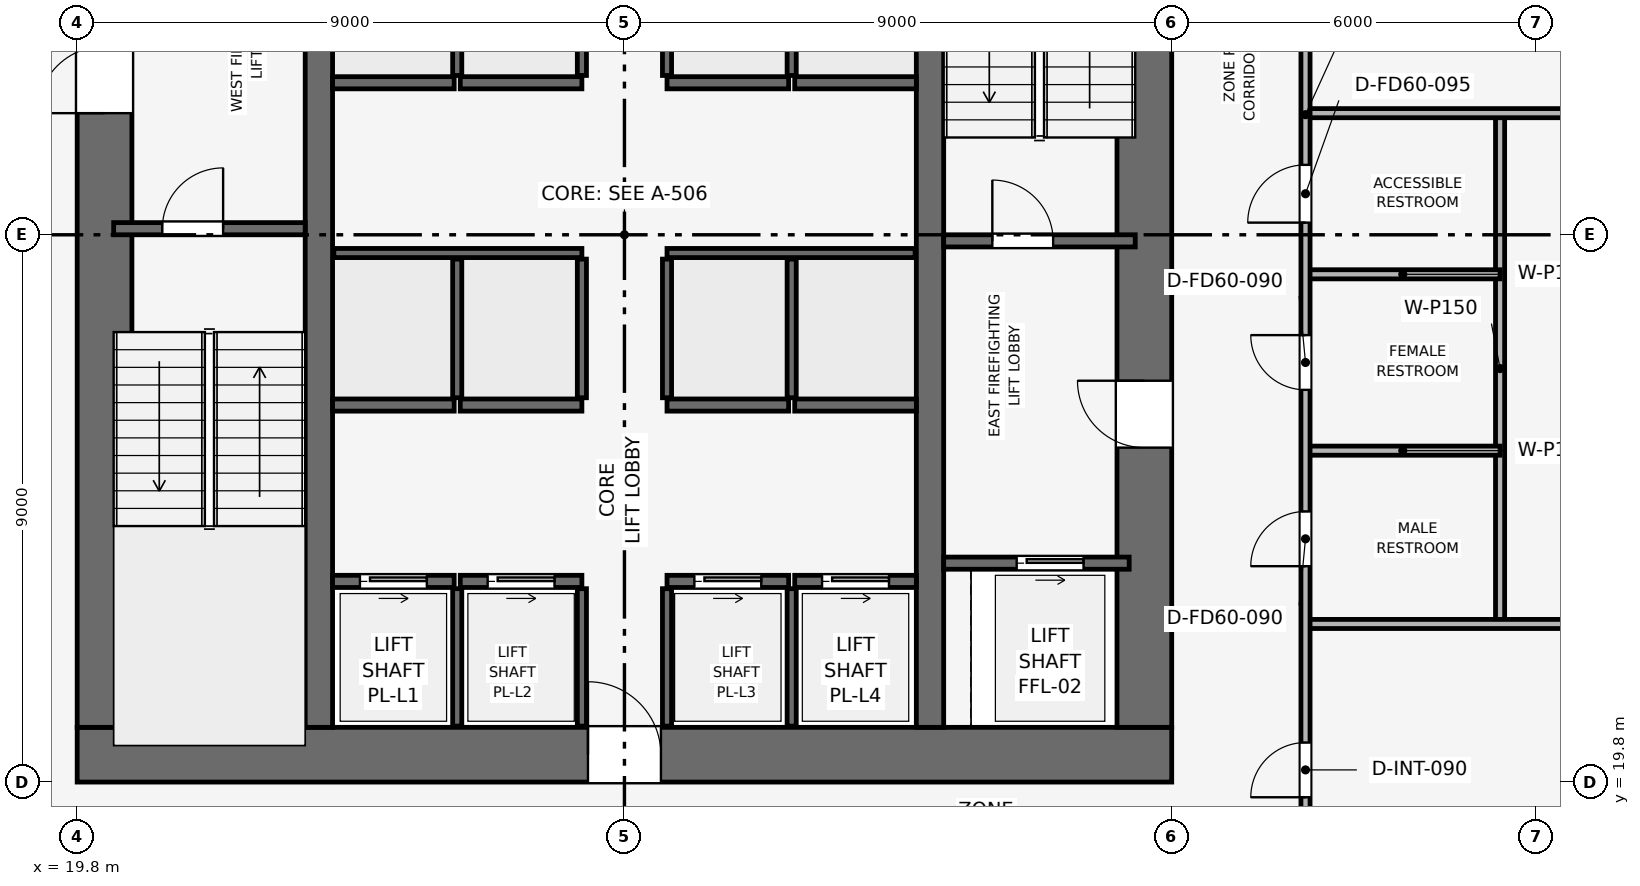
"""IFC4 building model, lengths in metres.
Left out: names, types, materials, properties, quantities, classifications, styles, units other than length and angle.
Written with IfcOpenShell. Run it as: python <this file> out.ifc"""

import sys

from ifc_helpers import new_model, si_unit, direction, frame, frame_2d, origin, place, context, subcontext, project, spatial, rectangle, extrude, element, fill, save


model = new_model("IFC4")
c1 = context("Model", 3, precision=1e-05, world=origin(), true_north=direction((0.0, 1.0)))
c2 = subcontext(c1, "Body", "Model", "MODEL_VIEW")
j1 = project(units=[si_unit("LENGTHUNIT", "METRE"), si_unit("PLANEANGLEUNIT", "RADIAN")], contexts=[c1])
p1 = place(None, origin())
s1 = spatial("IfcSite", under=j1, at=p1, CompositionType="ELEMENT")
p2 = place(p1, origin())
s2 = spatial("IfcBuilding", under=s1, at=p2, CompositionType="ELEMENT")
p3 = place(p2, frame((0.0, 0.0, 117.3)))
s3 = spatial("IfcBuildingStorey", under=s2, at=p3, CompositionType="ELEMENT", Elevation=117.3)
p4 = place(p3, frame((19.8, 20.25, 0.0), z_axis=(0.0, 0.0, 1.0), x_axis=(1.0, 0.0, 0.0)))
e1 = element("IfcWall", 1, at=p4, inside=s3, PredefinedType="SHEAR", context=c2, shape_type="SweptSolid", body=[
    extrude(rectangle(XDim=18.0, YDim=0.9, at=frame_2d((9.0, 0.0))), origin(), (0.0, 0.0, 1.0), 3.9),
])
p5 = place(p4, frame((8.4, 0.0, 0.0)))
e2 = element("IfcOpeningElement", 2, at=p5, cuts=e1, PredefinedType="OPENING", context=c2, shape_type="SweptSolid", body=[
    extrude(rectangle(XDim=1.2, YDim=2.2, at=frame_2d((0.6, 1.1))), frame((0.0, 0.46, 0.0), z_axis=(0.0, -1.0, 0.0), x_axis=(1.0, 0.0, 0.0)), (0.0, 0.0, 1.0), 0.92),
])
p6 = place(p3, frame((20.25, 20.7, 0.0), z_axis=(0.0, 0.0, 1.0), x_axis=(0.0, 1.0, 0.0)))
e3 = element("IfcWall", 3, at=p6, inside=s3, PredefinedType="SHEAR", context=c2, shape_type="SweptSolid", body=[
    extrude(rectangle(XDim=16.2, YDim=0.9, at=frame_2d((8.1, 0.0))), origin(), (0.0, 0.0, 1.0), 3.9),
])
p7 = place(p6, frame((10.1, 0.0, 0.0)))
e4 = element("IfcOpeningElement", 4, at=p7, cuts=e3, PredefinedType="OPENING", context=c2, shape_type="SweptSolid", body=[
    extrude(rectangle(XDim=1.1, YDim=2.15, at=frame_2d((0.55, 1.075))), frame((0.0, 0.46, 0.0), z_axis=(0.0, -1.0, 0.0), x_axis=(1.0, 0.0, 0.0)), (0.0, 0.0, 1.0), 0.92),
])
p8 = place(p3, frame((37.35, 20.7, 0.0), z_axis=(0.0, 0.0, 1.0), x_axis=(0.0, 1.0, 0.0)))
e5 = element("IfcWall", 5, at=p8, inside=s3, PredefinedType="SHEAR", context=c2, shape_type="SweptSolid", body=[
    extrude(rectangle(XDim=16.2, YDim=0.9, at=frame_2d((8.1, 0.0))), origin(), (0.0, 0.0, 1.0), 3.9),
])
p9 = place(p8, frame((4.6, 0.0, 0.0)))
e6 = element("IfcOpeningElement", 6, at=p9, cuts=e5, PredefinedType="OPENING", context=c2, shape_type="SweptSolid", body=[
    extrude(rectangle(XDim=1.1, YDim=2.15, at=frame_2d((0.55, 1.075))), frame((0.0, 0.46, 0.0), z_axis=(0.0, -1.0, 0.0), x_axis=(1.0, 0.0, 0.0)), (0.0, 0.0, 1.0), 0.92),
])
for number, where, z_axis, x_axis in (
    (7, (23.775, 20.7, 0.0), (0.0, 0.0, 1.0), (0.0, 1.0, 0.0)),
    (8, (33.825, 20.7, 0.0), (0.0, 0.0, 1.0), (0.0, 1.0, 0.0)),
):
    element("IfcWall", number, at=place(p3, frame(where, z_axis=z_axis, x_axis=x_axis)), inside=s3, PredefinedType="SHEAR", context=c2, shape_type="SweptSolid", body=[
        extrude(rectangle(XDim=16.2, YDim=0.45, at=frame_2d((8.1, 0.0))), origin(), (0.0, 0.0, 1.0), 3.9),
    ])
p10 = place(p3, frame((20.4, 28.9, 0.0), z_axis=(0.0, 0.0, 1.0), x_axis=(1.0, 0.0, 0.0)))
e9 = element("IfcWall", 9, at=p10, inside=s3, PredefinedType="SHEAR", context=c2, shape_type="SweptSolid", body=[
    extrude(rectangle(XDim=3.15, YDim=0.2, at=frame_2d((1.575, 0.0))), origin(), (0.0, 0.0, 1.0), 3.65),
])
p11 = place(p10, frame((0.8, 0.0, 0.0)))
e10 = element("IfcOpeningElement", 10, at=p11, cuts=e9, PredefinedType="OPENING", context=c2, shape_type="SweptSolid", body=[
    extrude(rectangle(XDim=1.0, YDim=2.1, at=frame_2d((0.5, 1.05))), frame((0.0, 0.11, 0.0), z_axis=(0.0, -1.0, 0.0), x_axis=(1.0, 0.0, 0.0)), (0.0, 0.0, 1.0), 0.22),
])
p12 = place(p3, frame((34.05, 28.7, 0.0), z_axis=(0.0, 0.0, 1.0), x_axis=(1.0, 0.0, 0.0)))
e11 = element("IfcWall", 11, at=p12, inside=s3, PredefinedType="SHEAR", context=c2, shape_type="SweptSolid", body=[
    extrude(rectangle(XDim=3.15, YDim=0.2, at=frame_2d((1.575, 0.0))), origin(), (0.0, 0.0, 1.0), 3.65),
])
p13 = place(p12, frame((0.8, 0.0, 0.0)))
e12 = element("IfcOpeningElement", 12, at=p13, cuts=e11, PredefinedType="OPENING", context=c2, shape_type="SweptSolid", body=[
    extrude(rectangle(XDim=1.0, YDim=2.1, at=frame_2d((0.5, 1.05))), frame((0.0, 0.11, 0.0), z_axis=(0.0, -1.0, 0.0), x_axis=(1.0, 0.0, 0.0)), (0.0, 0.0, 1.0), 0.22),
])
p14 = place(p3, frame((34.05, 23.4, 0.0), z_axis=(0.0, 0.0, 1.0), x_axis=(1.0, 0.0, 0.0)))
e13 = element("IfcWall", 13, at=p14, inside=s3, PredefinedType="SHEAR", context=c2, shape_type="SweptSolid", body=[
    extrude(rectangle(XDim=3.05, YDim=0.2, at=frame_2d((1.525, 0.0))), origin(), (0.0, 0.0, 1.0), 3.65),
])
p15 = place(p14, frame((1.2, 0.0, 0.0)))
e14 = element("IfcOpeningElement", 14, at=p15, cuts=e13, PredefinedType="OPENING", context=c2, shape_type="SweptSolid", body=[
    extrude(rectangle(XDim=1.1, YDim=2.15, at=frame_2d((0.55, 1.075))), frame((0.0, 0.11, 0.0), z_axis=(0.0, -1.0, 0.0), x_axis=(1.0, 0.0, 0.0)), (0.0, 0.0, 1.0), 0.22),
])
p16 = place(p3, frame((24.0, 23.1, 0.0), z_axis=(0.0, 0.0, 1.0), x_axis=(1.0, 0.0, 0.0)))
e15 = element("IfcWall", 15, at=p16, inside=s3, PredefinedType="SHEAR", context=c2, shape_type="SweptSolid", body=[
    extrude(rectangle(XDim=2.0, YDim=0.2, at=frame_2d((1.0, 0.0))), origin(), (0.0, 0.0, 1.0), 3.65),
])
p17 = place(p16, frame((0.45, 0.0, 0.0)))
e16 = element("IfcOpeningElement", 16, at=p17, cuts=e15, PredefinedType="OPENING", context=c2, shape_type="SweptSolid", body=[
    extrude(rectangle(XDim=1.1, YDim=2.15, at=frame_2d((0.55, 1.075))), frame((0.0, 0.11, 0.0), z_axis=(0.0, -1.0, 0.0), x_axis=(1.0, 0.0, 0.0)), (0.0, 0.0, 1.0), 0.22),
])
p18 = place(p3, frame((26.1, 23.1, 0.0), z_axis=(0.0, 0.0, 1.0), x_axis=(1.0, 0.0, 0.0)))
e17 = element("IfcWall", 17, at=p18, inside=s3, PredefinedType="SHEAR", context=c2, shape_type="SweptSolid", body=[
    extrude(rectangle(XDim=2.0, YDim=0.2, at=frame_2d((1.0, 0.0))), origin(), (0.0, 0.0, 1.0), 3.65),
])
p19 = place(p18, frame((0.45, 0.0, 0.0)))
e18 = element("IfcOpeningElement", 18, at=p19, cuts=e17, PredefinedType="OPENING", context=c2, shape_type="SweptSolid", body=[
    extrude(rectangle(XDim=1.1, YDim=2.15, at=frame_2d((0.55, 1.075))), frame((0.0, 0.11, 0.0), z_axis=(0.0, -1.0, 0.0), x_axis=(1.0, 0.0, 0.0)), (0.0, 0.0, 1.0), 0.22),
])
p20 = place(p3, frame((29.5, 23.1, 0.0), z_axis=(0.0, 0.0, 1.0), x_axis=(1.0, 0.0, 0.0)))
e19 = element("IfcWall", 19, at=p20, inside=s3, PredefinedType="SHEAR", context=c2, shape_type="SweptSolid", body=[
    extrude(rectangle(XDim=2.0, YDim=0.2, at=frame_2d((1.0, 0.0))), origin(), (0.0, 0.0, 1.0), 3.65),
])
p21 = place(p20, frame((0.45, 0.0, 0.0)))
e20 = element("IfcOpeningElement", 20, at=p21, cuts=e19, PredefinedType="OPENING", context=c2, shape_type="SweptSolid", body=[
    extrude(rectangle(XDim=1.1, YDim=2.15, at=frame_2d((0.55, 1.075))), frame((0.0, 0.11, 0.0), z_axis=(0.0, -1.0, 0.0), x_axis=(1.0, 0.0, 0.0)), (0.0, 0.0, 1.0), 0.22),
])
p22 = place(p3, frame((31.6, 23.1, 0.0), z_axis=(0.0, 0.0, 1.0), x_axis=(1.0, 0.0, 0.0)))
e21 = element("IfcWall", 21, at=p22, inside=s3, PredefinedType="SHEAR", context=c2, shape_type="SweptSolid", body=[
    extrude(rectangle(XDim=2.0, YDim=0.2, at=frame_2d((1.0, 0.0))), origin(), (0.0, 0.0, 1.0), 3.65),
])
p23 = place(p22, frame((0.45, 0.0, 0.0)))
e22 = element("IfcOpeningElement", 22, at=p23, cuts=e21, PredefinedType="OPENING", context=c2, shape_type="SweptSolid", body=[
    extrude(rectangle(XDim=1.1, YDim=2.15, at=frame_2d((0.55, 1.075))), frame((0.0, 0.11, 0.0), z_axis=(0.0, -1.0, 0.0), x_axis=(1.0, 0.0, 0.0)), (0.0, 0.0, 1.0), 0.22),
])
for number, where, z_axis, x_axis in (
    (23, (24.0, 26.0, 0.0), (0.0, 0.0, 1.0), (1.0, 0.0, 0.0)),
    (24, (26.1, 26.0, 0.0), (0.0, 0.0, 1.0), (1.0, 0.0, 0.0)),
    (25, (29.5, 26.0, 0.0), (0.0, 0.0, 1.0), (1.0, 0.0, 0.0)),
    (26, (31.6, 26.0, 0.0), (0.0, 0.0, 1.0), (1.0, 0.0, 0.0)),
    (27, (24.0, 31.3, 0.0), (0.0, 0.0, 1.0), (1.0, 0.0, 0.0)),
    (28, (26.1, 31.3, 0.0), (0.0, 0.0, 1.0), (1.0, 0.0, 0.0)),
    (29, (29.5, 31.3, 0.0), (0.0, 0.0, 1.0), (1.0, 0.0, 0.0)),
    (30, (31.6, 31.3, 0.0), (0.0, 0.0, 1.0), (1.0, 0.0, 0.0)),
):
    element("IfcWall", number, at=place(p3, frame(where, z_axis=z_axis, x_axis=x_axis)), inside=s3, PredefinedType="SHEAR", context=c2, shape_type="SweptSolid", body=[
        extrude(rectangle(XDim=2.0, YDim=0.2, at=frame_2d((1.0, 0.0))), origin(), (0.0, 0.0, 1.0), 3.65),
    ])
for number, where, z_axis, x_axis in (
    (31, (26.05, 20.72, 0.0), (0.0, 0.0, 1.0), (0.0, 1.0, 0.0)),
    (32, (28.1, 20.72, 0.0), (0.0, 0.0, 1.0), (0.0, 1.0, 0.0)),
    (33, (29.5, 20.72, 0.0), (0.0, 0.0, 1.0), (0.0, 1.0, 0.0)),
    (34, (31.55, 20.72, 0.0), (0.0, 0.0, 1.0), (0.0, 1.0, 0.0)),
):
    element("IfcWall", number, at=place(p3, frame(where, z_axis=z_axis, x_axis=x_axis)), inside=s3, PredefinedType="SHEAR", context=c2, shape_type="SweptSolid", body=[
        extrude(rectangle(XDim=2.26, YDim=0.15, at=frame_2d((1.13, 0.0))), origin(), (0.0, 0.0, 1.0), 3.65),
    ])
for number, where, z_axis, x_axis in (
    (35, (24.02, 28.5, 0.0), (0.0, 0.0, 1.0), (1.0, 0.0, 0.0)),
    (36, (29.5, 28.5, 0.0), (0.0, 0.0, 1.0), (1.0, 0.0, 0.0)),
):
    element("IfcWall", number, at=place(p3, frame(where, z_axis=z_axis, x_axis=x_axis)), inside=s3, PredefinedType="SHEAR", context=c2, shape_type="SweptSolid", body=[
        extrude(rectangle(XDim=4.08, YDim=0.15, at=frame_2d((2.04, 0.0))), origin(), (0.0, 0.0, 1.0), 3.65),
    ])
for number, where, z_axis, x_axis in (
    (37, (26.05, 26.12, 0.0), (0.0, 0.0, 1.0), (0.0, 1.0, 0.0)),
    (38, (28.1, 26.12, 0.0), (0.0, 0.0, 1.0), (0.0, 1.0, 0.0)),
    (39, (29.5, 26.12, 0.0), (0.0, 0.0, 1.0), (0.0, 1.0, 0.0)),
    (40, (31.55, 26.12, 0.0), (0.0, 0.0, 1.0), (0.0, 1.0, 0.0)),
):
    element("IfcWall", number, at=place(p3, frame(where, z_axis=z_axis, x_axis=x_axis)), inside=s3, PredefinedType="SHEAR", context=c2, shape_type="SweptSolid", body=[
        extrude(rectangle(XDim=2.28, YDim=0.15, at=frame_2d((1.14, 0.0))), origin(), (0.0, 0.0, 1.0), 3.65),
    ])
for number, where, z_axis, x_axis in (
    (41, (26.05, 31.42, 0.0), (0.0, 0.0, 1.0), (0.0, 1.0, 0.0)),
    (42, (28.1, 31.42, 0.0), (0.0, 0.0, 1.0), (0.0, 1.0, 0.0)),
    (43, (29.5, 31.42, 0.0), (0.0, 0.0, 1.0), (0.0, 1.0, 0.0)),
    (44, (31.55, 31.42, 0.0), (0.0, 0.0, 1.0), (0.0, 1.0, 0.0)),
):
    element("IfcWall", number, at=place(p3, frame(where, z_axis=z_axis, x_axis=x_axis)), inside=s3, PredefinedType="SHEAR", context=c2, shape_type="SweptSolid", body=[
        extrude(rectangle(XDim=2.24, YDim=0.15, at=frame_2d((1.12, 0.0))), origin(), (0.0, 0.0, 1.0), 3.65),
    ])
p24 = place(p3, frame((43.2, 22.4, 0.0), z_axis=(0.0, 0.0, 1.0), x_axis=(0.0, 1.0, 0.0)))
e45 = element("IfcWall", 45, at=p24, inside=s3, PredefinedType="PARTITIONING", context=c2, shape_type="SweptSolid", body=[
    extrude(rectangle(XDim=8.4, YDim=0.15, at=frame_2d((4.2, 0.0))), origin(), (0.0, 0.0, 1.0), 3.185),
])
p25 = place(p3, frame((40.0, 22.4, 0.0), z_axis=(0.0, 0.0, 1.0), x_axis=(1.0, 0.0, 0.0)))
e46 = element("IfcWall", 46, at=p25, inside=s3, PredefinedType="PARTITIONING", context=c2, shape_type="SweptSolid", body=[
    extrude(rectangle(XDim=14.77, YDim=0.15, at=frame_2d((7.385, 0.0))), origin(), (0.0, 0.0, 1.0), 3.035),
])
p26 = place(p25, frame((8.535, 0.0, 0.0)))
e47 = element("IfcOpeningElement", 47, at=p26, cuts=e46, PredefinedType="OPENING", context=c2, shape_type="SweptSolid", body=[
    extrude(rectangle(XDim=0.9, YDim=2.1, at=frame_2d((0.45, 1.05))), frame((0.0, 0.085, 0.0), z_axis=(0.0, -1.0, 0.0), x_axis=(1.0, 0.0, 0.0)), (0.0, 0.0, 1.0), 0.17),
])
p27 = place(p3, frame((40.0, 30.8, 0.0), z_axis=(0.0, 0.0, 1.0), x_axis=(1.0, 0.0, 0.0)))
e48 = element("IfcWall", 48, at=p27, inside=s3, PredefinedType="PARTITIONING", context=c2, shape_type="SweptSolid", body=[
    extrude(rectangle(XDim=14.77, YDim=0.15, at=frame_2d((7.385, 0.0))), origin(), (0.0, 0.0, 1.0), 3.035),
])
for number, where, z_axis, x_axis in (
    (49, (40.0, 25.25, 0.0), (0.0, 0.0, 1.0), (1.0, 0.0, 0.0)),
    (50, (40.0, 28.15, 0.0), (0.0, 0.0, 1.0), (1.0, 0.0, 0.0)),
):
    element("IfcWall", number, at=place(p3, frame(where, z_axis=z_axis, x_axis=x_axis)), inside=s3, PredefinedType="PARTITIONING", context=c2, shape_type="SweptSolid", body=[
        extrude(rectangle(XDim=3.2, YDim=0.15, at=frame_2d((1.6, 0.0))), origin(), (0.0, 0.0, 1.0), 3.65),
    ])
p28 = place(p3, frame((40.0, 17.6, 0.0), z_axis=(0.0, 0.0, 1.0), x_axis=(0.0, 1.0, 0.0)))
e51 = element("IfcWall", 51, at=p28, inside=s3, PredefinedType="PARTITIONING", context=c2, shape_type="SweptSolid", body=[
    extrude(rectangle(XDim=22.4, YDim=0.15, at=frame_2d((11.2, 0.0))), origin(), (0.0, 0.0, 1.0), 3.185),
])
p29 = place(p28, frame((1.95, 0.0, 0.0)))
e52 = element("IfcOpeningElement", 52, at=p29, cuts=e51, PredefinedType="OPENING", context=c2, shape_type="SweptSolid", body=[
    extrude(rectangle(XDim=0.9, YDim=2.1, at=frame_2d((0.45, 1.05))), frame((0.0, 0.085, 0.0), z_axis=(0.0, -1.0, 0.0), x_axis=(1.0, 0.0, 0.0)), (0.0, 0.0, 1.0), 0.17),
])
p30 = place(p28, frame((5.75, 0.0, 0.0)))
e53 = element("IfcOpeningElement", 53, at=p30, cuts=e51, PredefinedType="OPENING", context=c2, shape_type="SweptSolid", body=[
    extrude(rectangle(XDim=0.9, YDim=2.1, at=frame_2d((0.45, 1.05))), frame((0.0, 0.085, 0.0), z_axis=(0.0, -1.0, 0.0), x_axis=(1.0, 0.0, 0.0)), (0.0, 0.0, 1.0), 0.17),
])
p31 = place(p28, frame((8.65, 0.0, 0.0)))
e54 = element("IfcOpeningElement", 54, at=p31, cuts=e51, PredefinedType="OPENING", context=c2, shape_type="SweptSolid", body=[
    extrude(rectangle(XDim=0.9, YDim=2.1, at=frame_2d((0.45, 1.05))), frame((0.0, 0.085, 0.0), z_axis=(0.0, -1.0, 0.0), x_axis=(1.0, 0.0, 0.0)), (0.0, 0.0, 1.0), 0.17),
])
p32 = place(p28, frame((11.4, 0.0, 0.0)))
e55 = element("IfcOpeningElement", 55, at=p32, cuts=e51, PredefinedType="OPENING", context=c2, shape_type="SweptSolid", body=[
    extrude(rectangle(XDim=0.95, YDim=2.1, at=frame_2d((0.475, 1.05))), frame((0.0, 0.085, 0.0), z_axis=(0.0, -1.0, 0.0), x_axis=(1.0, 0.0, 0.0)), (0.0, 0.0, 1.0), 0.17),
])
p33 = place(p28, frame((17.35, 0.0, 0.0)))
e56 = element("IfcOpeningElement", 56, at=p33, cuts=e51, PredefinedType="OPENING", context=c2, shape_type="SweptSolid", body=[
    extrude(rectangle(XDim=0.9, YDim=2.1, at=frame_2d((0.45, 1.05))), frame((0.0, 0.085, 0.0), z_axis=(0.0, -1.0, 0.0), x_axis=(1.0, 0.0, 0.0)), (0.0, 0.0, 1.0), 0.17),
])
p34 = place(p11, origin())
e57 = element("IfcDoor", 57, at=p34, inside=s3, OperationType="SINGLE_SWING_RIGHT", PredefinedType="DOOR", context=c2, shape_type="SweptSolid", body=[
    extrude(rectangle(XDim=1.0, YDim=2.1, at=frame_2d((0.5, 1.05))), frame((0.0, 0.025, 0.0), z_axis=(0.0, -1.0, 0.0), x_axis=(1.0, 0.0, 0.0)), (0.0, 0.0, 1.0), 0.05),
])
fill(e10, e57)
p35 = place(p13, origin())
e58 = element("IfcDoor", 58, at=p35, inside=s3, OperationType="SINGLE_SWING_LEFT", PredefinedType="DOOR", context=c2, shape_type="SweptSolid", body=[
    extrude(rectangle(XDim=1.0, YDim=2.1, at=frame_2d((0.5, 1.05))), frame((0.0, 0.025, 0.0), z_axis=(0.0, -1.0, 0.0), x_axis=(1.0, 0.0, 0.0)), (0.0, 0.0, 1.0), 0.05),
])
fill(e12, e58)
p36 = place(p15, origin())
e59 = element("IfcDoor", 59, at=p36, inside=s3, OperationType="SLIDING_TO_RIGHT", PredefinedType="DOOR", context=c2, shape_type="SweptSolid", body=[
    extrude(rectangle(XDim=1.1, YDim=2.15, at=frame_2d((0.55, 1.075))), frame((0.0, 0.025, 0.0), z_axis=(0.0, -1.0, 0.0), x_axis=(1.0, 0.0, 0.0)), (0.0, 0.0, 1.0), 0.05),
])
fill(e14, e59)
p37 = place(p17, origin())
e60 = element("IfcDoor", 60, at=p37, inside=s3, OperationType="SLIDING_TO_RIGHT", PredefinedType="DOOR", context=c2, shape_type="SweptSolid", body=[
    extrude(rectangle(XDim=1.1, YDim=2.15, at=frame_2d((0.55, 1.075))), frame((0.0, 0.025, 0.0), z_axis=(0.0, -1.0, 0.0), x_axis=(1.0, 0.0, 0.0)), (0.0, 0.0, 1.0), 0.05),
])
fill(e16, e60)
p38 = place(p19, origin())
e61 = element("IfcDoor", 61, at=p38, inside=s3, OperationType="SLIDING_TO_RIGHT", PredefinedType="DOOR", context=c2, shape_type="SweptSolid", body=[
    extrude(rectangle(XDim=1.1, YDim=2.15, at=frame_2d((0.55, 1.075))), frame((0.0, 0.025, 0.0), z_axis=(0.0, -1.0, 0.0), x_axis=(1.0, 0.0, 0.0)), (0.0, 0.0, 1.0), 0.05),
])
fill(e18, e61)
p39 = place(p21, origin())
e62 = element("IfcDoor", 62, at=p39, inside=s3, OperationType="SLIDING_TO_RIGHT", PredefinedType="DOOR", context=c2, shape_type="SweptSolid", body=[
    extrude(rectangle(XDim=1.1, YDim=2.15, at=frame_2d((0.55, 1.075))), frame((0.0, 0.025, 0.0), z_axis=(0.0, -1.0, 0.0), x_axis=(1.0, 0.0, 0.0)), (0.0, 0.0, 1.0), 0.05),
])
fill(e20, e62)
p40 = place(p23, origin())
e63 = element("IfcDoor", 63, at=p40, inside=s3, OperationType="SLIDING_TO_RIGHT", PredefinedType="DOOR", context=c2, shape_type="SweptSolid", body=[
    extrude(rectangle(XDim=1.1, YDim=2.15, at=frame_2d((0.55, 1.075))), frame((0.0, 0.025, 0.0), z_axis=(0.0, -1.0, 0.0), x_axis=(1.0, 0.0, 0.0)), (0.0, 0.0, 1.0), 0.05),
])
fill(e22, e63)
p41 = place(p29, origin())
e64 = element("IfcDoor", 64, at=p41, inside=s3, OperationType="SINGLE_SWING_LEFT", PredefinedType="DOOR", context=c2, shape_type="SweptSolid", body=[
    extrude(rectangle(XDim=0.9, YDim=2.1, at=frame_2d((0.45, 1.05))), frame((0.0, 0.025, 0.0), z_axis=(0.0, -1.0, 0.0), x_axis=(1.0, 0.0, 0.0)), (0.0, 0.0, 1.0), 0.05),
])
fill(e52, e64)
p42 = place(p30, origin())
e65 = element("IfcDoor", 65, at=p42, inside=s3, OperationType="SINGLE_SWING_LEFT", PredefinedType="DOOR", context=c2, shape_type="SweptSolid", body=[
    extrude(rectangle(XDim=0.9, YDim=2.1, at=frame_2d((0.45, 1.05))), frame((0.0, 0.025, 0.0), z_axis=(0.0, -1.0, 0.0), x_axis=(1.0, 0.0, 0.0)), (0.0, 0.0, 1.0), 0.05),
])
fill(e53, e65)
p43 = place(p31, origin())
e66 = element("IfcDoor", 66, at=p43, inside=s3, OperationType="SINGLE_SWING_RIGHT", PredefinedType="DOOR", context=c2, shape_type="SweptSolid", body=[
    extrude(rectangle(XDim=0.9, YDim=2.1, at=frame_2d((0.45, 1.05))), frame((0.0, 0.025, 0.0), z_axis=(0.0, -1.0, 0.0), x_axis=(1.0, 0.0, 0.0)), (0.0, 0.0, 1.0), 0.05),
])
fill(e54, e66)
p44 = place(p32, origin())
e67 = element("IfcDoor", 67, at=p44, inside=s3, OperationType="SINGLE_SWING_LEFT", PredefinedType="DOOR", context=c2, shape_type="SweptSolid", body=[
    extrude(rectangle(XDim=0.95, YDim=2.1, at=frame_2d((0.475, 1.05))), frame((0.0, 0.025, 0.0), z_axis=(0.0, -1.0, 0.0), x_axis=(1.0, 0.0, 0.0)), (0.0, 0.0, 1.0), 0.05),
])
fill(e55, e67)
p45 = place(p7, origin())
e68 = element("IfcDoor", 68, at=p45, inside=s3, OperationType="SINGLE_SWING_LEFT", PredefinedType="DOOR", context=c2, shape_type="SweptSolid", body=[
    extrude(rectangle(XDim=1.1, YDim=2.15, at=frame_2d((0.55, 1.075))), frame((0.0, 0.025, 0.0), z_axis=(0.0, -1.0, 0.0), x_axis=(1.0, 0.0, 0.0)), (0.0, 0.0, 1.0), 0.05),
])
fill(e4, e68)
p46 = place(p9, origin())
e69 = element("IfcDoor", 69, at=p46, inside=s3, OperationType="SINGLE_SWING_RIGHT", PredefinedType="DOOR", context=c2, shape_type="SweptSolid", body=[
    extrude(rectangle(XDim=1.1, YDim=2.15, at=frame_2d((0.55, 1.075))), frame((0.0, 0.025, 0.0), z_axis=(0.0, -1.0, 0.0), x_axis=(1.0, 0.0, 0.0)), (0.0, 0.0, 1.0), 0.05),
])
fill(e6, e69)
p47 = place(p5, origin())
e70 = element("IfcDoor", 70, at=p47, inside=s3, OperationType="SINGLE_SWING_LEFT", PredefinedType="DOOR", context=c2, shape_type="SweptSolid", body=[
    extrude(rectangle(XDim=1.2, YDim=2.2, at=frame_2d((0.6, 1.1))), frame((0.0, 0.025, 0.0), z_axis=(0.0, -1.0, 0.0), x_axis=(1.0, 0.0, 0.0)), (0.0, 0.0, 1.0), 0.05),
])
fill(e2, e70)
save(model, sys.argv[1])
